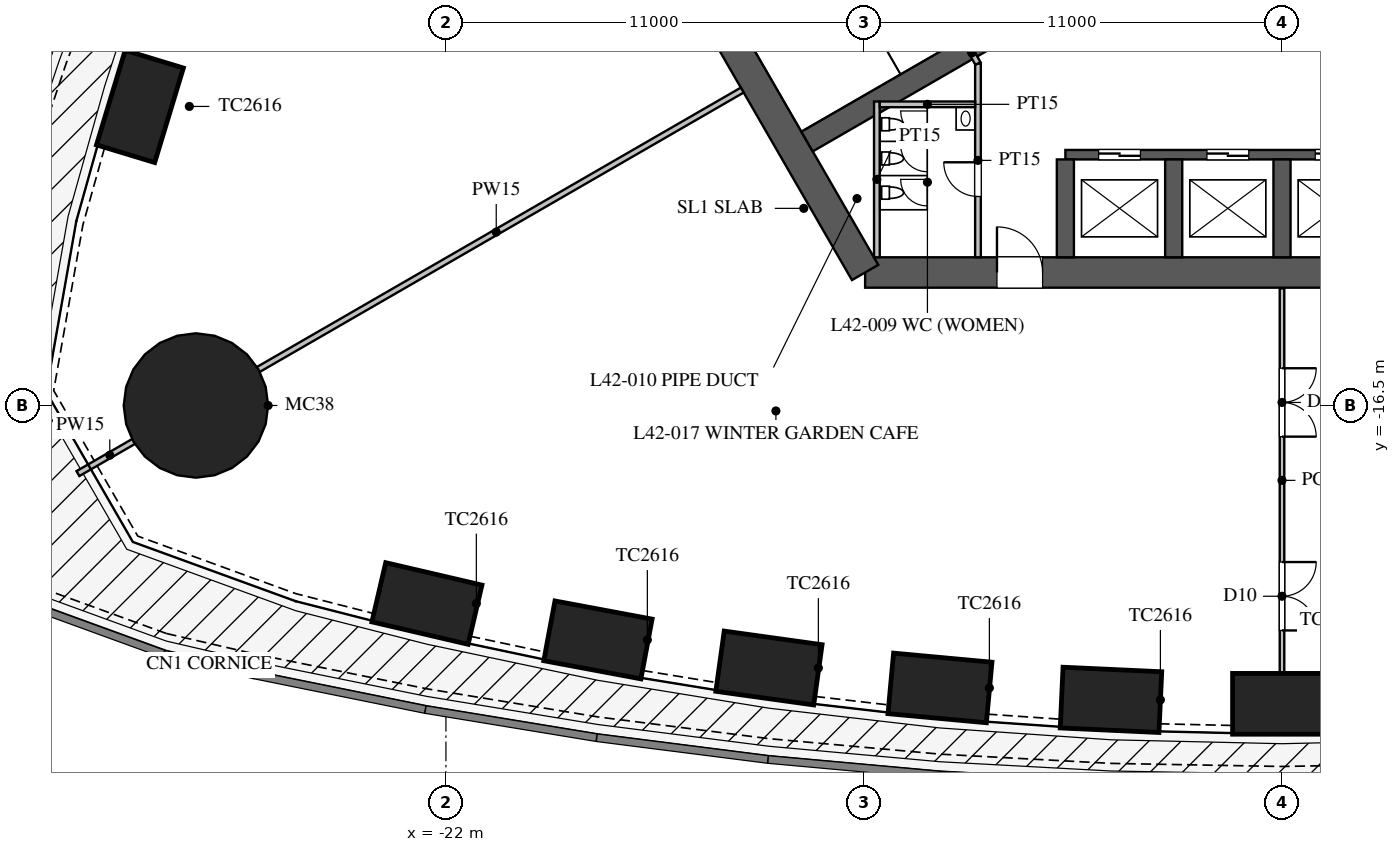
"""IFC4 building model, lengths in metres.
Left out: names, types, materials, properties, quantities, classifications, styles, units other than length and angle.
Written with IfcOpenShell. Run it as: python <this file> out.ifc"""

import sys

from ifc_helpers import new_model, si_unit, direction, frame, frame_2d, origin, origin_2d, place, context, subcontext, project, spatial, rectangle, circle, extrude, element, fill, save


model = new_model("IFC4")
c1 = context("Model", 3, precision=1e-05, world=origin(), true_north=direction((0.0, 1.0)))
c2 = subcontext(c1, "Body", "Model", "MODEL_VIEW")
j1 = project(units=[si_unit("LENGTHUNIT", "METRE"), si_unit("PLANEANGLEUNIT", "RADIAN")], contexts=[c1])
p1 = place(None, origin())
s1 = spatial("IfcSite", under=j1, at=p1, CompositionType="ELEMENT")
p2 = place(p1, origin())
s2 = spatial("IfcBuilding", under=s1, at=p2, CompositionType="ELEMENT")
p3 = place(p2, frame((0.0, 0.0, 184.7)))
s3 = spatial("IfcBuildingStorey", under=s2, at=p3, CompositionType="ELEMENT", Elevation=184.7)
for number, where, z_axis, x_axis in (
    (1, (-22.5, -21.71, 0.0), (0.0, 0.0, 1.0), (0.974, -0.227, 0.0)),
    (2, (-18.0, -22.669, 0.0), (0.0, 0.0, 1.0), (0.983, -0.184, 0.0)),
    (3, (-13.5, -23.408, 0.0), (0.0, 0.0, 1.0), (0.99, -0.138, 0.0)),
    (4, (-9.0, -23.933, 0.0), (0.0, 0.0, 1.0), (0.996, -0.092, 0.0)),
    (5, (-4.5, -24.246, 0.0), (0.0, 0.0, 1.0), (0.999, -0.046, 0.0)),
    (6, (0.0, -24.351, 0.0), (0.0, 0.0, 1.0), (1.0, 0.0, 0.0)),
    (7, (-30.052, -8.63, 0.0), (0.0, 0.0, 1.0), (-0.29, -0.957, 0.0)),
):
    element("IfcColumn", number, at=place(p3, frame(where, z_axis=z_axis, x_axis=x_axis)), inside=s3, PredefinedType="COLUMN", context=c2, shape_type="SweptSolid", body=[
        extrude(rectangle(XDim=2.6, YDim=1.6, at=origin_2d()), origin(), (0.0, 0.0, 1.0), 5.0),
    ])
p4 = place(p3, frame((-28.579, -16.5, 0.0), z_axis=(0.0, 0.0, 1.0), x_axis=(1.0, 0.0, 0.0)))
e8 = element("IfcColumn", 8, at=p4, inside=s3, PredefinedType="COLUMN", context=c2, shape_type="SweptSolid", body=[
    extrude(circle(Radius=1.9, at=origin_2d()), origin(), (0.0, 0.0, 1.0), 5.0),
])
p5 = place(p3, frame((-10.97, -13.0, 0.0), z_axis=(0.0, 0.0, 1.0), x_axis=(1.0, 0.0, 0.0)))
e9 = element("IfcWall", 9, at=p5, inside=s3, PredefinedType="SHEAR", context=c2, shape_type="SweptSolid", body=[
    extrude(rectangle(XDim=21.939, YDim=0.8, at=frame_2d((10.97, 0.0))), origin(), (0.0, 0.0, 1.0), 5.0),
])
p6 = place(p5, frame((17.27, 0.0, 0.0)))
e10 = element("IfcOpeningElement", 10, at=p6, cuts=e9, PredefinedType="OPENING", context=c2, shape_type="SweptSolid", body=[
    extrude(rectangle(XDim=1.2, YDim=2.1, at=frame_2d((0.6, 1.05))), frame((0.0, 0.41, 0.0), z_axis=(0.0, -1.0, 0.0), x_axis=(1.0, 0.0, 0.0)), (0.0, 0.0, 1.0), 0.82),
])
p7 = place(p5, frame((3.47, 0.0, 0.0)))
e11 = element("IfcOpeningElement", 11, at=p7, cuts=e9, PredefinedType="OPENING", context=c2, shape_type="SweptSolid", body=[
    extrude(rectangle(XDim=1.2, YDim=2.1, at=frame_2d((0.6, 1.05))), frame((0.0, 0.41, 0.0), z_axis=(0.0, -1.0, 0.0), x_axis=(1.0, 0.0, 0.0)), (0.0, 0.0, 1.0), 0.82),
])
p8 = place(p3, frame((-16.743, -3.0, 0.0), z_axis=(0.0, 0.0, 1.0), x_axis=(0.499995765644, -0.866027848477, 0.0)))
e12 = element("IfcWall", 12, at=p8, inside=s3, PredefinedType="SHEAR", context=c2, shape_type="SweptSolid", body=[
    extrude(rectangle(XDim=11.547, YDim=0.8, at=frame_2d((5.773, 0.0))), origin(), (0.0, 0.0, 1.0), 5.0),
])
p9 = place(p3, frame((-5.7, -9.9, 0.0), z_axis=(0.0, 0.0, 1.0), x_axis=(1.0, 0.0, 0.0)))
e13 = element("IfcWall", 13, at=p9, inside=s3, PredefinedType="SHEAR", context=c2, shape_type="SweptSolid", body=[
    extrude(rectangle(XDim=11.4, YDim=0.25, at=frame_2d((5.7, 0.0))), origin(), (0.0, 0.0, 1.0), 5.0),
])
p10 = place(p9, frame((0.875, 0.0, 0.0)))
e14 = element("IfcOpeningElement", 14, at=p10, cuts=e13, PredefinedType="OPENING", context=c2, shape_type="SweptSolid", body=[
    extrude(rectangle(XDim=1.1, YDim=2.2, at=frame_2d((0.55, 1.1))), frame((0.0, 0.135, 0.0), z_axis=(0.0, -1.0, 0.0), x_axis=(1.0, 0.0, 0.0)), (0.0, 0.0, 1.0), 0.27),
])
p11 = place(p9, frame((3.725, 0.0, 0.0)))
e15 = element("IfcOpeningElement", 15, at=p11, cuts=e13, PredefinedType="OPENING", context=c2, shape_type="SweptSolid", body=[
    extrude(rectangle(XDim=1.1, YDim=2.2, at=frame_2d((0.55, 1.1))), frame((0.0, 0.135, 0.0), z_axis=(0.0, -1.0, 0.0), x_axis=(1.0, 0.0, 0.0)), (0.0, 0.0, 1.0), 0.27),
])
p12 = place(p9, frame((6.575, 0.0, 0.0)))
e16 = element("IfcOpeningElement", 16, at=p12, cuts=e13, PredefinedType="OPENING", context=c2, shape_type="SweptSolid", body=[
    extrude(rectangle(XDim=1.1, YDim=2.2, at=frame_2d((0.55, 1.1))), frame((0.0, 0.135, 0.0), z_axis=(0.0, -1.0, 0.0), x_axis=(1.0, 0.0, 0.0)), (0.0, 0.0, 1.0), 0.27),
])
p13 = place(p9, frame((9.425, 0.0, 0.0)))
e17 = element("IfcOpeningElement", 17, at=p13, cuts=e13, PredefinedType="OPENING", context=c2, shape_type="SweptSolid", body=[
    extrude(rectangle(XDim=1.1, YDim=2.2, at=frame_2d((0.55, 1.1))), frame((0.0, 0.135, 0.0), z_axis=(0.0, -1.0, 0.0), x_axis=(1.0, 0.0, 0.0)), (0.0, 0.0, 1.0), 0.27),
])
for number, where, z_axis, x_axis in (
    (18, (-5.7, -10.025, 0.0), (0.0, 0.0, 1.0), (0.0, -1.0, 0.0)),
    (19, (-2.85, -10.025, 0.0), (0.0, 0.0, 1.0), (0.0, -1.0, 0.0)),
    (20, (0.0, -10.025, 0.0), (0.0, 0.0, 1.0), (0.0, -1.0, 0.0)),
):
    element("IfcWall", number, at=place(p3, frame(where, z_axis=z_axis, x_axis=x_axis)), inside=s3, PredefinedType="SHEAR", context=c2, shape_type="SweptSolid", body=[
        extrude(rectangle(XDim=2.575, YDim=0.45, at=frame_2d((1.288, 0.0))), origin(), (0.0, 0.0, 1.0), 5.0),
    ])
p14 = place(p3, frame((-4.638, -5.016, 0.0), z_axis=(0.0, 0.0, 1.0), x_axis=(-0.866019375473, -0.500010441196, 0.0)))
e21 = element("IfcWall", 21, at=p14, inside=s3, PredefinedType="SHEAR", context=c2, shape_type="SweptSolid", body=[
    extrude(rectangle(XDim=9.075, YDim=0.6, at=frame_2d((4.538, 0.0))), origin(), (0.0, 0.0, 1.0), 5.0),
])
p15 = place(p3, frame((-29.358, -22.825, 0.0), z_axis=(0.0, 0.0, 1.0), x_axis=(0.974203832844, -0.225669874089, 0.0)))
e22 = element("IfcWall", 22, at=p15, inside=s3, PredefinedType="PARAPET", context=c2, shape_type="SweptSolid", body=[
    extrude(rectangle(XDim=2.42, YDim=0.25, at=frame_2d((1.21, 0.0))), origin(), (0.0, 0.0, 1.0), 1.1),
])
p16 = place(p3, frame((-27.0, -23.371, 0.0), z_axis=(0.0, 0.0, 1.0), x_axis=(0.980152955069, -0.198242741781, 0.0)))
e23 = element("IfcWall", 23, at=p16, inside=s3, PredefinedType="PARAPET", context=c2, shape_type="SweptSolid", body=[
    extrude(rectangle(XDim=4.591, YDim=0.25, at=frame_2d((2.295, 0.0))), origin(), (0.0, 0.0, 1.0), 1.1),
])
p17 = place(p3, frame((-22.5, -24.281, 0.0), z_axis=(0.0, 0.0, 1.0), x_axis=(0.986764681833, -0.162158757664, 0.0)))
e24 = element("IfcWall", 24, at=p17, inside=s3, PredefinedType="PARAPET", context=c2, shape_type="SweptSolid", body=[
    extrude(rectangle(XDim=4.56, YDim=0.25, at=frame_2d((2.28, 0.0))), origin(), (0.0, 0.0, 1.0), 1.1),
])
p18 = place(p3, frame((-18.0, -25.021, 0.0), z_axis=(0.0, 0.0, 1.0), x_axis=(0.992010652594, -0.12615413247, 0.0)))
e25 = element("IfcWall", 25, at=p18, inside=s3, PredefinedType="PARAPET", context=c2, shape_type="SweptSolid", body=[
    extrude(rectangle(XDim=4.536, YDim=0.25, at=frame_2d((2.268, 0.0))), origin(), (0.0, 0.0, 1.0), 1.1),
])
p19 = place(p3, frame((-13.5, -25.593, 0.0), z_axis=(0.0, 0.0, 1.0), x_axis=(0.995930325215, -0.090126507295, 0.0)))
e26 = element("IfcWall", 26, at=p19, inside=s3, PredefinedType="PARAPET", context=c2, shape_type="SweptSolid", body=[
    extrude(rectangle(XDim=4.518, YDim=0.25, at=frame_2d((2.259, 0.0))), origin(), (0.0, 0.0, 1.0), 1.1),
])
p20 = place(p3, frame((-9.0, -26.0, 0.0), z_axis=(0.0, 0.0, 1.0), x_axis=(0.998537376538, -0.054065771581, 0.0)))
e27 = element("IfcWall", 27, at=p20, inside=s3, PredefinedType="PARAPET", context=c2, shape_type="SweptSolid", body=[
    extrude(rectangle(XDim=4.507, YDim=0.25, at=frame_2d((2.253, 0.0))), origin(), (0.0, 0.0, 1.0), 1.1),
])
for number, where, z_axis, x_axis in (
    (28, (-4.5, -26.244, 0.0), (0.0, 0.0, 1.0), (1.0, -0.018, 0.0)),
    (29, (0.0, -26.325, 0.0), (0.0, 0.0, 1.0), (1.0, 0.018, 0.0)),
):
    element("IfcWall", number, at=place(p3, frame(where, z_axis=z_axis, x_axis=x_axis)), inside=s3, PredefinedType="PARAPET", context=c2, shape_type="SweptSolid", body=[
        extrude(rectangle(XDim=4.501, YDim=0.25, at=frame_2d((2.25, 0.0))), origin(), (0.0, 0.0, 1.0), 1.1),
    ])
p21 = place(p3, frame((-30.668, -3.078, 0.0), z_axis=(0.0, 0.0, 1.0), x_axis=(-0.352894560512, -0.93566309597, 0.0)))
e30 = element("IfcWall", 30, at=p21, inside=s3, PredefinedType="PARAPET", context=c2, shape_type="SweptSolid", body=[
    extrude(rectangle(XDim=4.561, YDim=0.25, at=frame_2d((2.28, 0.0))), origin(), (0.0, 0.0, 1.0), 1.1),
])
p22 = place(p3, frame((-32.278, -7.345, 0.0), z_axis=(0.0, 0.0, 1.0), x_axis=(-0.318428474099, -0.947946890328, 0.0)))
e31 = element("IfcWall", 31, at=p22, inside=s3, PredefinedType="PARAPET", context=c2, shape_type="SweptSolid", body=[
    extrude(rectangle(XDim=4.591, YDim=0.25, at=frame_2d((2.295, 0.0))), origin(), (0.0, 0.0, 1.0), 1.1),
])
p23 = place(p3, frame((-33.134, -21.45, 0.0), z_axis=(0.0, 0.0, 1.0), x_axis=(0.939690503952, -0.342025959222, 0.0)))
e32 = element("IfcWall", 32, at=p23, inside=s3, PredefinedType="PARAPET", context=c2, shape_type="SweptSolid", body=[
    extrude(rectangle(XDim=4.019, YDim=0.25, at=frame_2d((2.009, 0.0))), origin(), (0.0, 0.0, 1.0), 1.1),
])
p24 = place(p3, frame((-8.0, -7.5, 0.0), z_axis=(0.0, 0.0, 1.0), x_axis=(0.0, -1.0, 0.0)))
e33 = element("IfcWall", 33, at=p24, inside=s3, PredefinedType="PARTITIONING", context=c2, shape_type="SweptSolid", body=[
    extrude(rectangle(XDim=5.1, YDim=0.15, at=frame_2d((2.55, 0.0))), origin(), (0.0, 0.0, 1.0), 4.8),
])
p25 = place(p24, frame((2.6, 0.0, 0.0)))
e34 = element("IfcOpeningElement", 34, at=p25, cuts=e33, PredefinedType="OPENING", context=c2, shape_type="SweptSolid", body=[
    extrude(rectangle(XDim=0.9, YDim=2.1, at=frame_2d((0.45, 1.05))), frame((0.0, 0.085, 0.0), z_axis=(0.0, -1.0, 0.0), x_axis=(1.0, 0.0, 0.0)), (0.0, 0.0, 1.0), 0.17),
])
p26 = place(p3, frame((-8.0, -7.5, 0.0), z_axis=(0.0, 0.0, 1.0), x_axis=(-0.499842556608, 0.866116284689, 0.0)))
e35 = element("IfcWall", 35, at=p26, inside=s3, PredefinedType="PARTITIONING", context=c2, shape_type="SweptSolid", body=[
    extrude(rectangle(XDim=0.645, YDim=0.15, at=frame_2d((0.323, 0.0))), origin(), (0.0, 0.0, 1.0), 4.8),
])
p27 = place(p3, frame((-10.66, -8.5, 0.0), z_axis=(0.0, 0.0, 1.0), x_axis=(0.0, -1.0, 0.0)))
e36 = element("IfcWall", 36, at=p27, inside=s3, PredefinedType="PARTITIONING", context=c2, shape_type="SweptSolid", body=[
    extrude(rectangle(XDim=4.1, YDim=0.15, at=frame_2d((2.05, 0.0))), origin(), (0.0, 0.0, 1.0), 4.8),
])
p28 = place(p3, frame((-8.075, -8.575, 0.0), z_axis=(0.0, 0.0, 1.0), x_axis=(-1.0, 0.0, 0.0)))
e37 = element("IfcWall", 37, at=p28, inside=s3, PredefinedType="PARTITIONING", context=c2, shape_type="SweptSolid", body=[
    extrude(rectangle(XDim=2.51, YDim=0.15, at=frame_2d((1.255, 0.0))), origin(), (0.0, 0.0, 1.0), 4.8),
])
p29 = place(p3, frame((-14.203, -8.2, 0.0), z_axis=(0.0, 0.0, 1.0), x_axis=(-0.866021600284, -0.500006587798, 0.0)))
e38 = element("IfcWall", 38, at=p29, inside=s3, PredefinedType="PARTITIONING", context=c2, shape_type="SweptSolid", body=[
    extrude(rectangle(XDim=14.95, YDim=0.15, at=frame_2d((7.475, 0.0))), origin(), (0.0, 0.0, 1.0), 3.2),
])
p30 = place(p3, frame((-30.008, -17.325, 0.0), z_axis=(0.0, 0.0, 1.0), x_axis=(-0.866013246922, -0.500021055713, 0.0)))
e39 = element("IfcWall", 39, at=p30, inside=s3, PredefinedType="PARTITIONING", context=c2, shape_type="SweptSolid", body=[
    extrude(rectangle(XDim=1.935, YDim=0.15, at=frame_2d((0.967, 0.0))), origin(), (0.0, 0.0, 1.0), 3.2),
])
p31 = place(p3, frame((0.0, -13.42, 0.0), z_axis=(0.0, 0.0, 1.0), x_axis=(0.0, -1.0, 0.0)))
e40 = element("IfcWall", 40, at=p31, inside=s3, PredefinedType="PARTITIONING", context=c2, shape_type="SweptSolid", body=[
    extrude(rectangle(XDim=10.101, YDim=0.12, at=frame_2d((5.05, 0.0))), origin(), (0.0, 0.0, 1.0), 3.4),
])
p32 = place(p31, frame((2.1, 0.0, 0.0)))
e41 = element("IfcOpeningElement", 41, at=p32, cuts=e40, PredefinedType="OPENING", context=c2, shape_type="SweptSolid", body=[
    extrude(rectangle(XDim=1.8, YDim=2.1, at=frame_2d((0.9, 1.05))), frame((0.0, 0.07, 0.0), z_axis=(0.0, -1.0, 0.0), x_axis=(1.0, 0.0, 0.0)), (0.0, 0.0, 1.0), 0.14),
])
p33 = place(p31, frame((7.2, 0.0, 0.0)))
e42 = element("IfcOpeningElement", 42, at=p33, cuts=e40, PredefinedType="OPENING", context=c2, shape_type="SweptSolid", body=[
    extrude(rectangle(XDim=1.8, YDim=2.1, at=frame_2d((0.9, 1.05))), frame((0.0, 0.07, 0.0), z_axis=(0.0, -1.0, 0.0), x_axis=(1.0, 0.0, 0.0)), (0.0, 0.0, 1.0), 0.14),
])
p34 = place(p25, frame((0.9, 0.0, 0.0), z_axis=(0.0, 0.0, 1.0), x_axis=(-1.0, 0.0, 0.0)))
e43 = element("IfcDoor", 43, at=p34, inside=s3, OperationType="SINGLE_SWING_RIGHT", PredefinedType="DOOR", context=c2, shape_type="SweptSolid", body=[
    extrude(rectangle(XDim=0.9, YDim=2.1, at=frame_2d((0.45, 1.05))), frame((0.0, 0.025, 0.0), z_axis=(0.0, -1.0, 0.0), x_axis=(1.0, 0.0, 0.0)), (0.0, 0.0, 1.0), 0.05),
])
fill(e34, e43)
p35 = place(p7, origin())
e44 = element("IfcDoor", 44, at=p35, inside=s3, OperationType="SINGLE_SWING_LEFT", PredefinedType="DOOR", context=c2, shape_type="SweptSolid", body=[
    extrude(rectangle(XDim=1.2, YDim=2.1, at=frame_2d((0.6, 1.05))), frame((0.0, 0.025, 0.0), z_axis=(0.0, -1.0, 0.0), x_axis=(1.0, 0.0, 0.0)), (0.0, 0.0, 1.0), 0.05),
])
fill(e11, e44)
p36 = place(p32, origin())
e45 = element("IfcDoor", 45, at=p36, inside=s3, OperationType="DOUBLE_DOOR_SINGLE_SWING", PredefinedType="DOOR", context=c2, shape_type="SweptSolid", body=[
    extrude(rectangle(XDim=1.8, YDim=2.1, at=frame_2d((0.9, 1.05))), frame((0.0, 0.025, 0.0), z_axis=(0.0, -1.0, 0.0), x_axis=(1.0, 0.0, 0.0)), (0.0, 0.0, 1.0), 0.05),
])
fill(e41, e45)
p37 = place(p33, origin())
e46 = element("IfcDoor", 46, at=p37, inside=s3, OperationType="DOUBLE_DOOR_SINGLE_SWING", PredefinedType="DOOR", context=c2, shape_type="SweptSolid", body=[
    extrude(rectangle(XDim=1.8, YDim=2.1, at=frame_2d((0.9, 1.05))), frame((0.0, 0.025, 0.0), z_axis=(0.0, -1.0, 0.0), x_axis=(1.0, 0.0, 0.0)), (0.0, 0.0, 1.0), 0.05),
])
fill(e42, e46)
p38 = place(p10, origin())
e47 = element("IfcDoor", 47, at=p38, inside=s3, OperationType="DOUBLE_DOOR_SLIDING", PredefinedType="DOOR", context=c2, shape_type="SweptSolid", body=[
    extrude(rectangle(XDim=1.1, YDim=2.2, at=frame_2d((0.55, 1.1))), frame((0.0, 0.025, 0.0), z_axis=(0.0, -1.0, 0.0), x_axis=(1.0, 0.0, 0.0)), (0.0, 0.0, 1.0), 0.05),
])
fill(e14, e47)
p39 = place(p11, origin())
e48 = element("IfcDoor", 48, at=p39, inside=s3, OperationType="DOUBLE_DOOR_SLIDING", PredefinedType="DOOR", context=c2, shape_type="SweptSolid", body=[
    extrude(rectangle(XDim=1.1, YDim=2.2, at=frame_2d((0.55, 1.1))), frame((0.0, 0.025, 0.0), z_axis=(0.0, -1.0, 0.0), x_axis=(1.0, 0.0, 0.0)), (0.0, 0.0, 1.0), 0.05),
])
fill(e15, e48)
p40 = place(p12, origin())
e49 = element("IfcDoor", 49, at=p40, inside=s3, OperationType="DOUBLE_DOOR_SLIDING", PredefinedType="DOOR", context=c2, shape_type="SweptSolid", body=[
    extrude(rectangle(XDim=1.1, YDim=2.2, at=frame_2d((0.55, 1.1))), frame((0.0, 0.025, 0.0), z_axis=(0.0, -1.0, 0.0), x_axis=(1.0, 0.0, 0.0)), (0.0, 0.0, 1.0), 0.05),
])
fill(e16, e49)
save(model, sys.argv[1])
